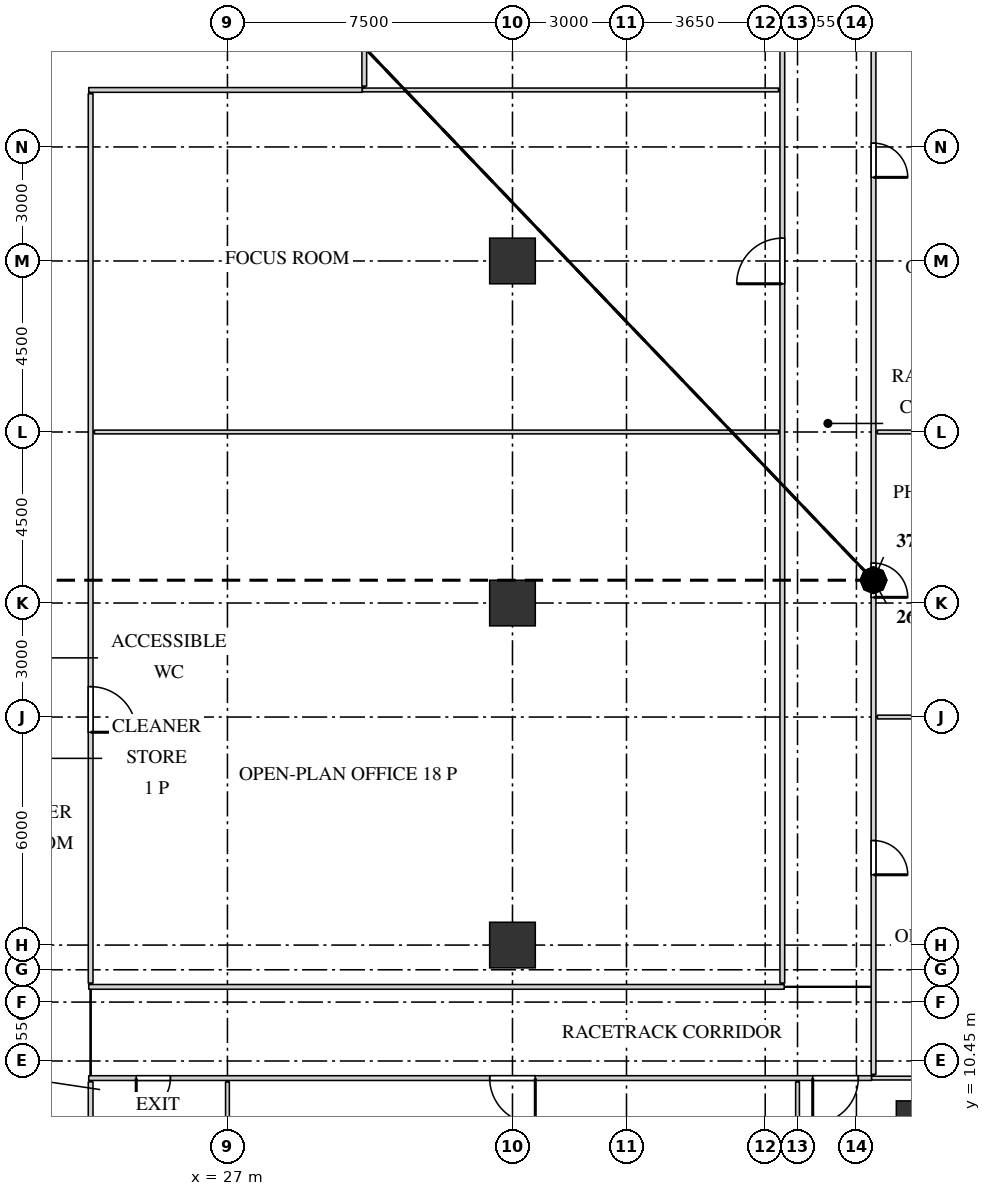
"""IFC4 building model, lengths in metres.
Left out: names, types, materials, properties, quantities, classifications, styles, units other than length and angle.
Written with IfcOpenShell. Run it as: python <this file> out.ifc"""

import sys

from ifc_helpers import new_model, si_unit, direction, frame, frame_2d, origin, origin_2d, place, context, subcontext, project, spatial, rectangle, extrude, source, transform, mapped, element, fill, save


model = new_model("IFC4")
c1 = context("Model", 3, precision=1e-05, world=origin(), true_north=direction((0.0, 1.0)))
c2 = subcontext(c1, "Body", "Model", "MODEL_VIEW")
j1 = project(units=[si_unit("LENGTHUNIT", "METRE"), si_unit("PLANEANGLEUNIT", "RADIAN")], contexts=[c1])
p1 = place(None, origin())
s1 = spatial("IfcSite", under=j1, at=p1, CompositionType="ELEMENT")
p2 = place(p1, origin())
s2 = spatial("IfcBuilding", under=s1, at=p2, CompositionType="ELEMENT")
p3 = place(p2, frame((0.0, 0.0, 188.7)))
s3 = spatial("IfcBuildingStorey", under=s2, at=p3, CompositionType="ELEMENT", Elevation=188.7)
m1 = source(origin(), c2, "Body", "SweptSolid", [
    extrude(rectangle(XDim=1.9, YDim=1.9, at=origin_2d()), origin(), (0.0, 0.0, 1.0), 4.0),
])
p4 = place(p3, frame((45.55, 8.45, 0.0), z_axis=(0.0, 0.0, 1.0), x_axis=(1.0, 0.0, 0.0)))
e1 = element("IfcColumn", 1, at=p4, inside=s3, PredefinedType="COLUMN", context=c2, shape_type="MappedRepresentation", body=[
    mapped(m1, transform((0.0, 0.0, 0.0))),
])
m2 = source(origin(), c2, "Body", "SweptSolid", [
    extrude(rectangle(XDim=1.2, YDim=1.2, at=origin_2d()), origin(), (0.0, 0.0, 1.0), 3.75),
])
for number, where, z_axis, x_axis in (
    (2, (34.5, 13.5, 0.0), (0.0, 0.0, 1.0), (1.0, 0.0, 0.0)),
    (3, (34.5, 22.5, 0.0), (0.0, 0.0, 1.0), (1.0, 0.0, 0.0)),
    (4, (34.5, 31.5, 0.0), (0.0, 0.0, 1.0), (1.0, 0.0, 0.0)),
):
    element("IfcColumn", number, at=place(p3, frame(where, z_axis=z_axis, x_axis=x_axis)), inside=s3, PredefinedType="COLUMN", context=c2, shape_type="MappedRepresentation", body=[
        mapped(m2, transform((0.0, 0.0, 0.0))),
    ])
m3 = source(origin(), c2, "Body", "SweptSolid", [
    extrude(rectangle(XDim=6.75, YDim=0.1, at=frame_2d((3.375, 0.0))), origin(), (0.0, 0.0, 1.0), 3.3),
])
for number, where, z_axis, x_axis in (
    (5, (27.0, 3.15, 0.0), (0.0, 0.0, 1.0), (0.0, 1.0, 0.0)),
    (6, (42.0, 3.15, 0.0), (0.0, 0.0, 1.0), (0.0, 1.0, 0.0)),
):
    element("IfcWall", number, at=place(p3, frame(where, z_axis=z_axis, x_axis=x_axis)), inside=s3, PredefinedType="PARTITIONING", context=c2, shape_type="MappedRepresentation", body=[
        mapped(m3, transform((0.0, 0.0, 0.0))),
    ])
m4 = source(origin(), c2, "Body", "SweptSolid", [
    extrude(rectangle(XDim=3.75, YDim=0.125, at=frame_2d((1.875, 0.0))), origin(), (0.0, 0.0, 1.0), 3.8),
])
p5 = place(p3, frame((23.4, 6.15, 0.0), z_axis=(0.0, 0.0, 1.0), x_axis=(0.0, 1.0, 0.0)))
e7 = element("IfcWall", 7, at=p5, inside=s3, PredefinedType="PARTITIONING", context=c2, shape_type="MappedRepresentation", body=[
    mapped(m4, transform((0.0, 0.0, 0.0))),
])
m5 = source(origin(), c2, "Body", "SweptSolid", [
    extrude(rectangle(XDim=20.6, YDim=0.125, at=frame_2d((10.3, 0.0))), origin(), (0.0, 0.0, 1.0), 3.8),
])
p6 = place(p3, frame((23.35, 10.0, 0.0), z_axis=(0.0, 0.0, 1.0), x_axis=(1.0, 0.0, 0.0)))
e8 = element("IfcWall", 8, at=p6, inside=s3, PredefinedType="PARTITIONING", context=c2, shape_type="MappedRepresentation", body=[
    mapped(m5, transform((0.0, 0.0, 0.0))),
])
m6 = source(origin(), c2, "Body", "SweptSolid", [
    extrude(rectangle(XDim=0.9, YDim=2.1, at=frame_2d((0.45, 1.05))), frame((0.0, 0.073, 0.0), z_axis=(0.0, -1.0, 0.0), x_axis=(1.0, 0.0, 0.0)), (0.0, 0.0, 1.0), 0.145),
])
p7 = place(p6, frame((1.25, 0.0, 0.0)))
e9 = element("IfcOpeningElement", 9, at=p7, cuts=e8, PredefinedType="OPENING", context=c2, shape_type="MappedRepresentation", body=[
    mapped(m6, transform((0.0, 0.0, 0.0))),
])
m7 = source(origin(), c2, "Body", "SweptSolid", [
    extrude(rectangle(XDim=1.2, YDim=2.1, at=frame_2d((0.6, 1.05))), frame((0.0, 0.073, 0.0), z_axis=(0.0, -1.0, 0.0), x_axis=(1.0, 0.0, 0.0)), (0.0, 0.0, 1.0), 0.145),
])
p8 = place(p6, frame((10.55, 0.0, 0.0)))
e10 = element("IfcOpeningElement", 10, at=p8, cuts=e8, PredefinedType="OPENING", context=c2, shape_type="MappedRepresentation", body=[
    mapped(m7, transform((0.0, 0.0, 0.0))),
])
p9 = place(p6, frame((19.05, 0.0, 0.0)))
e11 = element("IfcOpeningElement", 11, at=p9, cuts=e8, PredefinedType="OPENING", context=c2, shape_type="MappedRepresentation", body=[
    mapped(m7, transform((0.0, 0.0, 0.0))),
])
m8 = source(origin(), c2, "Body", "SweptSolid", [
    extrude(rectangle(XDim=6.9, YDim=0.1, at=frame_2d((3.45, 0.0))), origin(), (0.0, 0.0, 1.0), 3.8),
])
p10 = place(p3, frame((43.95, 10.0, 0.0), z_axis=(0.0, 0.0, 1.0), x_axis=(1.0, 0.0, 0.0)))
e12 = element("IfcWall", 12, at=p10, inside=s3, PredefinedType="PARTITIONING", context=c2, shape_type="MappedRepresentation", body=[
    mapped(m8, transform((0.0, 0.0, 0.0))),
])
m9 = source(origin(), c2, "Body", "SweptSolid", [
    extrude(rectangle(XDim=33.8, YDim=0.125, at=frame_2d((16.9, 0.0))), origin(), (0.0, 0.0, 1.0), 3.8),
])
p11 = place(p3, frame((44.0, 10.1, 0.0), z_axis=(0.0, 0.0, 1.0), x_axis=(0.0, 1.0, 0.0)))
e13 = element("IfcWall", 13, at=p11, inside=s3, PredefinedType="PARTITIONING", context=c2, shape_type="MappedRepresentation", body=[
    mapped(m9, transform((0.0, 0.0, 0.0))),
])
p12 = place(p11, frame((5.25, 0.0, 0.0)))
e14 = element("IfcOpeningElement", 14, at=p12, cuts=e13, PredefinedType="OPENING", context=c2, shape_type="MappedRepresentation", body=[
    mapped(m6, transform((0.0, 0.0, 0.0))),
])
p13 = place(p11, frame((12.55, 0.0, 0.0)))
e15 = element("IfcOpeningElement", 15, at=p13, cuts=e13, PredefinedType="OPENING", context=c2, shape_type="MappedRepresentation", body=[
    mapped(m6, transform((0.0, 0.0, 0.0))),
])
p14 = place(p11, frame((23.6, 0.0, 0.0)))
e16 = element("IfcOpeningElement", 16, at=p14, cuts=e13, PredefinedType="OPENING", context=c2, shape_type="MappedRepresentation", body=[
    mapped(m6, transform((0.0, 0.0, 0.0))),
])
p15 = place(p11, frame((32.3, 0.0, 0.0)))
e17 = element("IfcOpeningElement", 17, at=p15, cuts=e13, PredefinedType="OPENING", context=c2, shape_type="MappedRepresentation", body=[
    mapped(m6, transform((0.0, 0.0, 0.0))),
])
m10 = source(origin(), c2, "Body", "SweptSolid", [
    extrude(rectangle(XDim=18.3, YDim=0.125, at=frame_2d((9.15, 0.0))), origin(), (0.0, 0.0, 1.0), 3.8),
])
p16 = place(p3, frame((23.35, 12.4, 0.0), z_axis=(0.0, 0.0, 1.0), x_axis=(1.0, 0.0, 0.0)))
e18 = element("IfcWall", 18, at=p16, inside=s3, PredefinedType="PARTITIONING", context=c2, shape_type="MappedRepresentation", body=[
    mapped(m10, transform((0.0, 0.0, 0.0))),
])
m11 = source(origin(), c2, "Body", "SweptSolid", [
    extrude(rectangle(XDim=23.4, YDim=0.125, at=frame_2d((11.7, 0.0))), origin(), (0.0, 0.0, 1.0), 3.8),
])
p17 = place(p3, frame((23.4, 12.5, 0.0), z_axis=(0.0, 0.0, 1.0), x_axis=(0.0, 1.0, 0.0)))
e19 = element("IfcWall", 19, at=p17, inside=s3, PredefinedType="PARTITIONING", context=c2, shape_type="MappedRepresentation", body=[
    mapped(m11, transform((0.0, 0.0, 0.0))),
])
p18 = place(p17, frame((6.6, 0.0, 0.0)))
e20 = element("IfcOpeningElement", 20, at=p18, cuts=e19, PredefinedType="OPENING", context=c2, shape_type="MappedRepresentation", body=[
    mapped(m7, transform((0.0, 0.0, 0.0))),
])
m12 = source(origin(), c2, "Body", "SweptSolid", [
    extrude(rectangle(XDim=29.0, YDim=0.125, at=frame_2d((14.5, 0.0))), origin(), (0.0, 0.0, 1.0), 3.8),
])
p19 = place(p3, frame((41.6, 12.5, 0.0), z_axis=(0.0, 0.0, 1.0), x_axis=(0.0, 1.0, 0.0)))
e21 = element("IfcWall", 21, at=p19, inside=s3, PredefinedType="PARTITIONING", context=c2, shape_type="MappedRepresentation", body=[
    mapped(m12, transform((0.0, 0.0, 0.0))),
])
p20 = place(p19, frame((18.4, 0.0, 0.0)))
e22 = element("IfcOpeningElement", 22, at=p20, cuts=e21, PredefinedType="OPENING", context=c2, shape_type="MappedRepresentation", body=[
    mapped(m7, transform((0.0, 0.0, 0.0))),
])
m13 = source(origin(), c2, "Body", "SweptSolid", [
    extrude(rectangle(XDim=6.75, YDim=0.1, at=frame_2d((3.375, 0.0))), origin(), (0.0, 0.0, 1.0), 3.8),
])
p21 = place(p3, frame((44.1, 19.5, 0.0), z_axis=(0.0, 0.0, 1.0), x_axis=(1.0, 0.0, 0.0)))
e23 = element("IfcWall", 23, at=p21, inside=s3, PredefinedType="PARTITIONING", context=c2, shape_type="MappedRepresentation", body=[
    mapped(m13, transform((0.0, 0.0, 0.0))),
])
m14 = source(origin(), c2, "Body", "SweptSolid", [
    extrude(rectangle(XDim=18.0, YDim=0.1, at=frame_2d((9.0, 0.0))), origin(), (0.0, 0.0, 1.0), 3.8),
])
p22 = place(p3, frame((23.5, 27.0, 0.0), z_axis=(0.0, 0.0, 1.0), x_axis=(1.0, 0.0, 0.0)))
e24 = element("IfcWall", 24, at=p22, inside=s3, PredefinedType="PARTITIONING", context=c2, shape_type="MappedRepresentation", body=[
    mapped(m14, transform((0.0, 0.0, 0.0))),
])
p23 = place(p3, frame((44.1, 27.0, 0.0), z_axis=(0.0, 0.0, 1.0), x_axis=(1.0, 0.0, 0.0)))
e25 = element("IfcWall", 25, at=p23, inside=s3, PredefinedType="PARTITIONING", context=c2, shape_type="MappedRepresentation", body=[
    mapped(m13, transform((0.0, 0.0, 0.0))),
])
m15 = source(origin(), c2, "Body", "SweptSolid", [
    extrude(rectangle(XDim=7.2, YDim=0.125, at=frame_2d((3.6, 0.0))), origin(), (0.0, 0.0, 1.0), 3.8),
])
p24 = place(p3, frame((23.35, 36.0, 0.0), z_axis=(0.0, 0.0, 1.0), x_axis=(1.0, 0.0, 0.0)))
e26 = element("IfcWall", 26, at=p24, inside=s3, PredefinedType="PARTITIONING", context=c2, shape_type="MappedRepresentation", body=[
    mapped(m15, transform((0.0, 0.0, 0.0))),
])
m16 = source(origin(), c2, "Body", "SweptSolid", [
    extrude(rectangle(XDim=10.95, YDim=0.1, at=frame_2d((5.475, 0.0))), origin(), (0.0, 0.0, 1.0), 3.8),
])
p25 = place(p3, frame((30.55, 36.0, 0.0), z_axis=(0.0, 0.0, 1.0), x_axis=(1.0, 0.0, 0.0)))
e27 = element("IfcWall", 27, at=p25, inside=s3, PredefinedType="PARTITIONING", context=c2, shape_type="MappedRepresentation", body=[
    mapped(m16, transform((0.0, 0.0, 0.0))),
])
m17 = source(origin(), c2, "Body", "SweptSolid", [
    extrude(rectangle(XDim=5.4, YDim=0.125, at=frame_2d((2.7, 0.0))), origin(), (0.0, 0.0, 1.0), 3.8),
])
p26 = place(p3, frame((30.6, 36.1, 0.0), z_axis=(0.0, 0.0, 1.0), x_axis=(0.0, 1.0, 0.0)))
e28 = element("IfcWall", 28, at=p26, inside=s3, PredefinedType="PARTITIONING", context=c2, shape_type="MappedRepresentation", body=[
    mapped(m17, transform((0.0, 0.0, 0.0))),
])
m18 = source(origin(), c2, "Body", "SweptSolid", [
    extrude(rectangle(XDim=0.9, YDim=2.1, at=frame_2d((0.45, 1.05))), frame((0.0, 0.025, 0.0), z_axis=(0.0, -1.0, 0.0), x_axis=(1.0, 0.0, 0.0)), (0.0, 0.0, 1.0), 0.05),
])
p27 = place(p7, origin())
e29 = element("IfcDoor", 29, at=p27, inside=s3, OperationType="SINGLE_SWING_LEFT", PredefinedType="DOOR", context=c2, shape_type="MappedRepresentation", body=[
    mapped(m18, transform((0.0, 0.0, 0.0))),
])
fill(e9, e29)
m19 = source(origin(), c2, "Body", "SweptSolid", [
    extrude(rectangle(XDim=1.2, YDim=2.1, at=frame_2d((0.6, 1.05))), frame((0.0, 0.025, 0.0), z_axis=(0.0, -1.0, 0.0), x_axis=(1.0, 0.0, 0.0)), (0.0, 0.0, 1.0), 0.05),
])
p28 = place(p8, origin())
e30 = element("IfcDoor", 30, at=p28, inside=s3, OperationType="SINGLE_SWING_RIGHT", PredefinedType="DOOR", context=c2, shape_type="MappedRepresentation", body=[
    mapped(m19, transform((0.0, 0.0, 0.0))),
])
fill(e10, e30)
p29 = place(p9, origin())
e31 = element("IfcDoor", 31, at=p29, inside=s3, OperationType="SINGLE_SWING_LEFT", PredefinedType="DOOR", context=c2, shape_type="MappedRepresentation", body=[
    mapped(m19, transform((0.0, 0.0, 0.0))),
])
fill(e11, e31)
p30 = place(p12, origin())
e32 = element("IfcDoor", 32, at=p30, inside=s3, OperationType="SINGLE_SWING_LEFT", PredefinedType="DOOR", context=c2, shape_type="MappedRepresentation", body=[
    mapped(m18, transform((0.0, 0.0, 0.0))),
])
fill(e14, e32)
p31 = place(p13, origin())
e33 = element("IfcDoor", 33, at=p31, inside=s3, OperationType="SINGLE_SWING_LEFT", PredefinedType="DOOR", context=c2, shape_type="MappedRepresentation", body=[
    mapped(m18, transform((0.0, 0.0, 0.0))),
])
fill(e15, e33)
p32 = place(p14, origin())
e34 = element("IfcDoor", 34, at=p32, inside=s3, OperationType="SINGLE_SWING_LEFT", PredefinedType="DOOR", context=c2, shape_type="MappedRepresentation", body=[
    mapped(m18, transform((0.0, 0.0, 0.0))),
])
fill(e16, e34)
p33 = place(p18, origin())
e35 = element("IfcDoor", 35, at=p33, inside=s3, OperationType="SINGLE_SWING_LEFT", PredefinedType="DOOR", context=c2, shape_type="MappedRepresentation", body=[
    mapped(m19, transform((0.0, 0.0, 0.0))),
])
fill(e20, e35)
p34 = place(p20, origin())
e36 = element("IfcDoor", 36, at=p34, inside=s3, OperationType="SINGLE_SWING_RIGHT", PredefinedType="DOOR", context=c2, shape_type="MappedRepresentation", body=[
    mapped(m19, transform((0.0, 0.0, 0.0))),
])
fill(e22, e36)
save(model, sys.argv[1])
